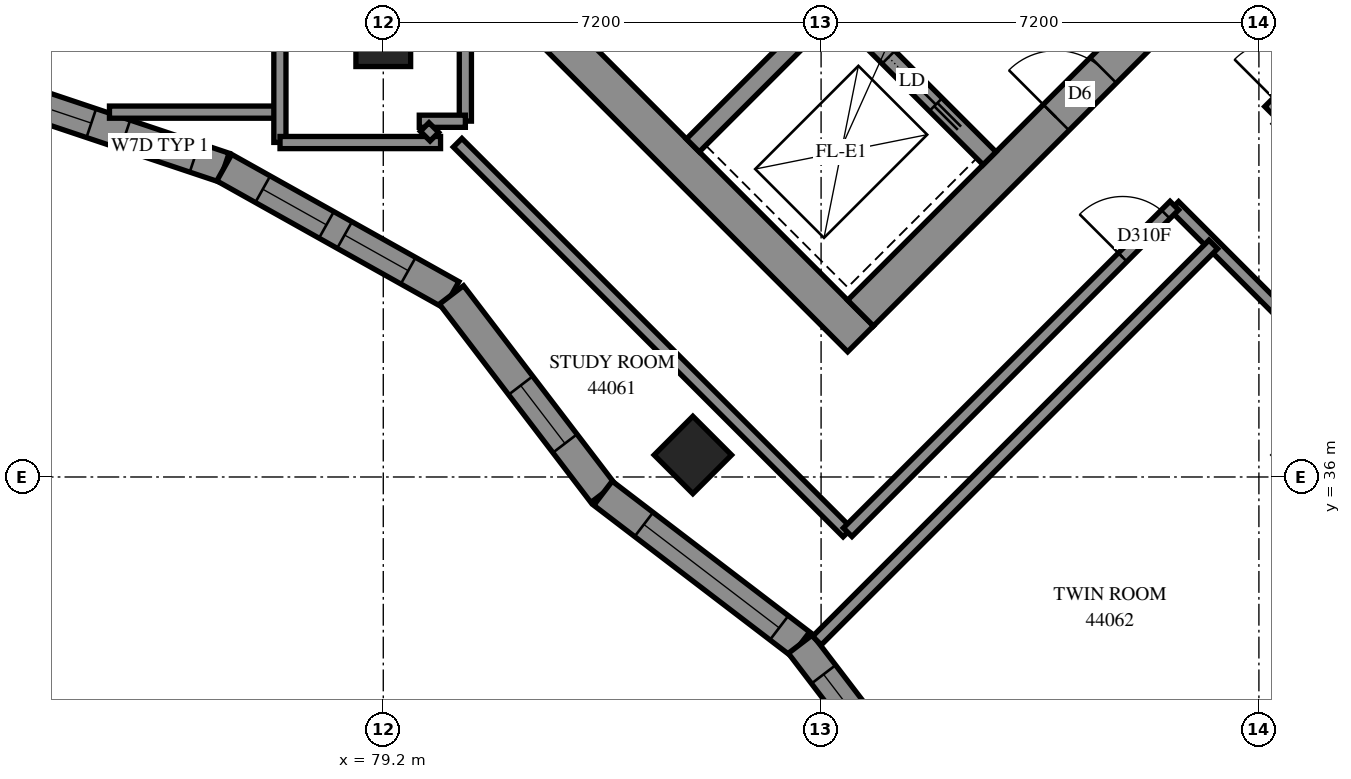
"""IFC4 building model, lengths in metres.
Left out: names, types, materials, properties, quantities, classifications, styles, units other than length and angle.
Written with IfcOpenShell. Run it as: python <this file> out.ifc"""

import sys

from ifc_helpers import new_model, si_unit, direction, frame, frame_2d, origin, origin_2d, place, context, subcontext, project, spatial, polyline, rectangle, outline, extrude, element, fill, save


model = new_model("IFC4")
c1 = context("Model", 3, precision=1e-05, world=origin(), true_north=direction((0.0, 1.0)))
c2 = subcontext(c1, "Body", "Model", "MODEL_VIEW")
j1 = project(units=[si_unit("LENGTHUNIT", "METRE"), si_unit("PLANEANGLEUNIT", "RADIAN")], contexts=[c1])
p1 = place(None, origin())
s1 = spatial("IfcSite", under=j1, at=p1, CompositionType="ELEMENT")
p2 = place(p1, origin())
s2 = spatial("IfcBuilding", under=s1, at=p2, CompositionType="ELEMENT")
p3 = place(p2, frame((0.0, 0.0, 162.6)))
s3 = spatial("IfcBuildingStorey", under=s2, at=p3, CompositionType="ELEMENT", Elevation=162.6)
for number, where, z_axis, x_axis in (
    (1, (79.2, 43.2, 0.0), (0.0, 0.0, 1.0), (1.0, 0.0, 0.0)),
    (2, (84.291, 36.362, 0.0), (0.0, 0.0, 1.0), (0.707, -0.707, 0.0)),
):
    element("IfcColumn", number, at=place(p3, frame(where, z_axis=z_axis, x_axis=x_axis)), inside=s3, PredefinedType="COLUMN", context=c2, shape_type="SweptSolid", body=[
        extrude(rectangle(XDim=0.9, YDim=0.9, at=origin_2d()), origin(), (0.0, 0.0, 1.0), 3.1),
    ])
p4 = place(p3, frame((76.018, 49.302, -0.3), z_axis=(0.0, 0.0, 1.0), x_axis=(0.7071067812, -0.7071067812, 0.0)))
e3 = element("IfcWall", 3, at=p4, inside=s3, PredefinedType="SHEAR", context=c2, shape_type="SweptSolid", body=[
    extrude(rectangle(XDim=15.6, YDim=0.6, at=frame_2d((7.8, 0.0))), origin(), (0.0, 0.0, 1.0), 2.7),
])
p5 = place(p3, frame((87.049, 38.695, -0.3), z_axis=(0.0, 0.0, 1.0), x_axis=(0.7071067812, 0.7071067812, 0.0)))
e4 = element("IfcWall", 4, at=p5, inside=s3, PredefinedType="SHEAR", context=c2, shape_type="SweptSolid", body=[
    extrude(rectangle(XDim=14.4, YDim=0.6, at=frame_2d((7.2, 0.0))), origin(), (0.0, 0.0, 1.0), 2.7),
])
p6 = place(p5, frame((4.55, 0.0, 0.3)))
e5 = element("IfcOpeningElement", 5, at=p6, cuts=e4, PredefinedType="OPENING", context=c2, shape_type="SweptSolid", body=[
    extrude(rectangle(XDim=1.1, YDim=2.1, at=frame_2d((0.55, 1.05))), frame((0.0, 0.31, 0.0), z_axis=(0.0, -1.0, 0.0), x_axis=(1.0, 0.0, 0.0)), (0.0, 0.0, 1.0), 0.62),
])
p7 = place(p5, frame((11.35, 0.0, 0.3)))
e6 = element("IfcOpeningElement", 6, at=p7, cuts=e4, PredefinedType="OPENING", context=c2, shape_type="SweptSolid", body=[
    extrude(rectangle(XDim=1.1, YDim=2.1, at=frame_2d((0.55, 1.05))), frame((0.0, 0.31, 0.0), z_axis=(0.0, -1.0, 0.0), x_axis=(1.0, 0.0, 0.0)), (0.0, 0.0, 1.0), 0.62),
])
p8 = place(p3, frame((84.291, 41.453, 0.0), z_axis=(0.0, 0.0, 1.0), x_axis=(0.7071067812, 0.7071067812, 0.0)))
e7 = element("IfcWall", 7, at=p8, inside=s3, PredefinedType="SOLIDWALL", context=c2, shape_type="SweptSolid", body=[
    extrude(rectangle(XDim=3.3, YDim=0.3, at=frame_2d((1.65, 0.0))), origin(), (0.0, 0.0, 1.0), 3.1),
])
p9 = place(p3, frame((78.988, 51.423, 0.0), z_axis=(0.0, 0.0, 1.0), x_axis=(0.7071067812, -0.7071067812, 0.0)))
e8 = element("IfcWall", 8, at=p9, inside=s3, PredefinedType="SOLIDWALL", context=c2, shape_type="SweptSolid", body=[
    extrude(rectangle(XDim=14.4, YDim=0.3, at=frame_2d((7.2, 0.0))), origin(), (0.0, 0.0, 1.0), 3.1),
])
p10 = place(p9, frame((1.35, 0.0, 0.0)))
e9 = element("IfcOpeningElement", 9, at=p10, cuts=e8, PredefinedType="OPENING", context=c2, shape_type="SweptSolid", body=[
    extrude(rectangle(XDim=0.9, YDim=2.1, at=frame_2d((0.45, 1.05))), frame((0.0, 0.16, 0.0), z_axis=(0.0, -1.0, 0.0), x_axis=(1.0, 0.0, 0.0)), (0.0, 0.0, 1.0), 0.32),
])
p11 = place(p9, frame((4.95, 0.0, 0.0)))
e10 = element("IfcOpeningElement", 10, at=p11, cuts=e8, PredefinedType="OPENING", context=c2, shape_type="SweptSolid", body=[
    extrude(rectangle(XDim=0.9, YDim=2.1, at=frame_2d((0.45, 1.05))), frame((0.0, 0.16, 0.0), z_axis=(0.0, -1.0, 0.0), x_axis=(1.0, 0.0, 0.0)), (0.0, 0.0, 1.0), 0.32),
])
p12 = place(p9, frame((8.55, 0.0, 0.0)))
e11 = element("IfcOpeningElement", 11, at=p12, cuts=e8, PredefinedType="OPENING", context=c2, shape_type="SweptSolid", body=[
    extrude(rectangle(XDim=0.9, YDim=2.1, at=frame_2d((0.45, 1.05))), frame((0.0, 0.16, 0.0), z_axis=(0.0, -1.0, 0.0), x_axis=(1.0, 0.0, 0.0)), (0.0, 0.0, 1.0), 0.32),
])
p13 = place(p9, frame((12.05, 0.0, 0.0)))
e12 = element("IfcOpeningElement", 12, at=p13, cuts=e8, PredefinedType="OPENING", context=c2, shape_type="SweptSolid", body=[
    extrude(rectangle(XDim=1.1, YDim=2.1, at=frame_2d((0.55, 1.05))), frame((0.0, 0.16, 0.0), z_axis=(0.0, -1.0, 0.0), x_axis=(1.0, 0.0, 0.0)), (0.0, 0.0, 1.0), 0.32),
])
p14 = place(p3, frame((73.094, 42.257, 0.0), z_axis=(0.0, 0.0, 1.0), x_axis=(0.9482477624, -0.3175313861, 0.0)))
e13 = element("IfcWall", 13, at=p14, inside=s3, PredefinedType="SOLIDWALL", context=c2, shape_type="SweptSolid", body=[
    extrude(outline(polyline([(0.061, -0.25), (3.658, -0.25), (3.705, 0.25), (-0.061, 0.25), (0.061, -0.25)])), origin(), (0.0, 0.0, 1.0), 3.1),
])
p15 = place(p14, frame((0.376, 0.0, 0.45)))
e14 = element("IfcOpeningElement", 14, at=p15, cuts=e13, PredefinedType="OPENING", context=c2, shape_type="SweptSolid", body=[
    extrude(rectangle(XDim=1.0, YDim=2.5, at=frame_2d((0.5, 1.25))), frame((0.0, 0.26, 0.0), z_axis=(0.0, -1.0, 0.0), x_axis=(1.0, 0.0, 0.0)), (0.0, 0.0, 1.0), 0.52),
])
p16 = place(p14, frame((1.967, 0.0, 0.5)))
e15 = element("IfcOpeningElement", 15, at=p16, cuts=e13, PredefinedType="OPENING", context=c2, shape_type="SweptSolid", body=[
    extrude(rectangle(XDim=1.2, YDim=2.45, at=frame_2d((0.6, 1.225))), frame((0.0, 0.26, 0.0), z_axis=(0.0, -1.0, 0.0), x_axis=(1.0, 0.0, 0.0)), (0.0, 0.0, 1.0), 0.52),
])
p17 = place(p3, frame((76.585, 41.088, 0.0), z_axis=(0.0, 0.0, 1.0), x_axis=(0.8724681922, -0.4886709053, 0.0)))
e16 = element("IfcWall", 16, at=p17, inside=s3, PredefinedType="SOLIDWALL", context=c2, shape_type="SweptSolid", body=[
    extrude(outline(polyline([(0.024, -0.25), (4.231, -0.25), (4.335, 0.25), (-0.024, 0.25), (0.024, -0.25)])), origin(), (0.0, 0.0, 1.0), 3.1),
])
p18 = place(p17, frame((0.727, 0.0, 0.45)))
e17 = element("IfcOpeningElement", 17, at=p18, cuts=e16, PredefinedType="OPENING", context=c2, shape_type="SweptSolid", body=[
    extrude(rectangle(XDim=1.2, YDim=2.5, at=frame_2d((0.6, 1.25))), frame((0.0, 0.26, 0.0), z_axis=(0.0, -1.0, 0.0), x_axis=(1.0, 0.0, 0.0)), (0.0, 0.0, 1.0), 0.52),
])
p19 = place(p17, frame((2.268, 0.0, 0.45)))
e18 = element("IfcOpeningElement", 18, at=p19, cuts=e16, PredefinedType="OPENING", context=c2, shape_type="SweptSolid", body=[
    extrude(rectangle(XDim=1.2, YDim=2.5, at=frame_2d((0.6, 1.25))), frame((0.0, 0.26, 0.0), z_axis=(0.0, -1.0, 0.0), x_axis=(1.0, 0.0, 0.0)), (0.0, 0.0, 1.0), 0.52),
])
p20 = place(p3, frame((80.322, 38.995, 0.0), z_axis=(0.0, 0.0, 1.0), x_axis=(0.6070711239, -0.7946475008, 0.0)))
e19 = element("IfcWall", 19, at=p20, inside=s3, PredefinedType="SOLIDWALL", context=c2, shape_type="SweptSolid", body=[
    extrude(outline(polyline([(0.052, -0.25), (4.138, -0.25), (4.071, 0.25), (-0.052, 0.25), (0.052, -0.25)])), origin(), (0.0, 0.0, 1.0), 3.1),
])
p21 = place(p20, frame((1.875, 0.0, 0.45)))
e20 = element("IfcOpeningElement", 20, at=p21, cuts=e19, PredefinedType="OPENING", context=c2, shape_type="SweptSolid", body=[
    extrude(rectangle(XDim=1.2, YDim=2.5, at=frame_2d((0.6, 1.25))), frame((0.0, 0.26, 0.0), z_axis=(0.0, -1.0, 0.0), x_axis=(1.0, 0.0, 0.0)), (0.0, 0.0, 1.0), 0.52),
])
p22 = place(p3, frame((82.813, 35.733, 0.0), z_axis=(0.0, 0.0, 1.0), x_axis=(0.7946501833, -0.6070676125, 0.0)))
e21 = element("IfcWall", 21, at=p22, inside=s3, PredefinedType="SOLIDWALL", context=c2, shape_type="SweptSolid", body=[
    extrude(outline(polyline([(-0.034, -0.25), (4.053, -0.25), (4.12, 0.25), (0.034, 0.25), (-0.034, -0.25)])), origin(), (0.0, 0.0, 1.0), 3.1),
])
p23 = place(p22, frame((0.846, 0.0, 0.45)))
e22 = element("IfcOpeningElement", 22, at=p23, cuts=e21, PredefinedType="OPENING", context=c2, shape_type="SweptSolid", body=[
    extrude(rectangle(XDim=2.8, YDim=2.5, at=frame_2d((1.4, 1.25))), frame((0.0, 0.26, 0.0), z_axis=(0.0, -1.0, 0.0), x_axis=(1.0, 0.0, 0.0)), (0.0, 0.0, 1.0), 0.52),
])
p24 = place(p3, frame((86.06, 33.252, 0.0), z_axis=(0.0, 0.0, 1.0), x_axis=(0.6070676125, -0.7946501833, 0.0)))
e23 = element("IfcWall", 23, at=p24, inside=s3, PredefinedType="SOLIDWALL", context=c2, shape_type="SweptSolid", body=[
    extrude(outline(polyline([(0.034, -0.25), (4.12, -0.25), (4.053, 0.25), (-0.034, 0.25), (0.034, -0.25)])), origin(), (0.0, 0.0, 1.0), 3.1),
])
p25 = place(p24, frame((0.626, 0.0, 0.45)))
e24 = element("IfcOpeningElement", 24, at=p25, cuts=e23, PredefinedType="OPENING", context=c2, shape_type="SweptSolid", body=[
    extrude(rectangle(XDim=2.8, YDim=2.5, at=frame_2d((1.4, 1.25))), frame((0.0, 0.26, 0.0), z_axis=(0.0, -1.0, 0.0), x_axis=(1.0, 0.0, 0.0)), (0.0, 0.0, 1.0), 0.52),
])
p26 = place(p3, frame((92.209, 40.459, 0.0), z_axis=(0.0, 0.0, 1.0), x_axis=(0.7071067812, -0.7071067812, 0.0)))
e25 = element("IfcWall", 25, at=p26, inside=s3, PredefinedType="PARTITIONING", context=c2, shape_type="SweptSolid", body=[
    extrude(rectangle(XDim=11.698, YDim=0.2, at=frame_2d((5.849, 0.0))), origin(), (0.0, 0.0, 1.0), 3.1),
])
p27 = place(p26, frame((2.908, 0.0, 0.0)))
e26 = element("IfcOpeningElement", 26, at=p27, cuts=e25, PredefinedType="OPENING", context=c2, shape_type="SweptSolid", body=[
    extrude(rectangle(XDim=0.9, YDim=2.1, at=frame_2d((0.45, 1.05))), frame((0.0, 0.11, 0.0), z_axis=(0.0, -1.0, 0.0), x_axis=(1.0, 0.0, 0.0)), (0.0, 0.0, 1.0), 0.22),
])
p28 = place(p26, frame((10.181, 0.0, 0.0)))
e27 = element("IfcOpeningElement", 27, at=p28, cuts=e25, PredefinedType="OPENING", context=c2, shape_type="SweptSolid", body=[
    extrude(rectangle(XDim=0.9, YDim=2.1, at=frame_2d((0.45, 1.05))), frame((0.0, 0.11, 0.0), z_axis=(0.0, -1.0, 0.0), x_axis=(1.0, 0.0, 0.0)), (0.0, 0.0, 1.0), 0.22),
])
p29 = place(p3, frame((93.767, 42.021, 0.0), z_axis=(0.0, 0.0, 1.0), x_axis=(0.7071067812, 0.7071067812, 0.0)))
e28 = element("IfcWall", 28, at=p29, inside=s3, PredefinedType="PARTITIONING", context=c2, shape_type="SweptSolid", body=[
    extrude(rectangle(XDim=9.998, YDim=0.2, at=frame_2d((4.999, 0.0))), origin(), (0.0, 0.0, 1.0), 3.1),
])
p30 = place(p29, frame((0.196, 0.0, 0.0)))
e29 = element("IfcOpeningElement", 29, at=p30, cuts=e28, PredefinedType="OPENING", context=c2, shape_type="SweptSolid", body=[
    extrude(rectangle(XDim=1.0, YDim=2.1, at=frame_2d((0.5, 1.05))), frame((0.0, 0.11, 0.0), z_axis=(0.0, -1.0, 0.0), x_axis=(1.0, 0.0, 0.0)), (0.0, 0.0, 1.0), 0.22),
])
p31 = place(p3, frame((86.332, 33.309, 0.0), z_axis=(0.0, 0.0, 1.0), x_axis=(0.7072098544, 0.7070036929, 0.0)))
e30 = element("IfcWall", 30, at=p31, inside=s3, PredefinedType="PARTITIONING", context=c2, shape_type="SweptSolid", body=[
    extrude(rectangle(XDim=9.216, YDim=0.2, at=frame_2d((4.608, 0.0))), origin(), (0.0, 0.0, 1.0), 3.1),
])
p32 = place(p3, frame((80.423, 41.497, 0.0), z_axis=(0.0, 0.0, 1.0), x_axis=(0.7071067812, -0.7071067812, 0.0)))
e31 = element("IfcWall", 31, at=p32, inside=s3, PredefinedType="PARTITIONING", context=c2, shape_type="SweptSolid", body=[
    extrude(rectangle(XDim=9.065, YDim=0.2, at=frame_2d((4.532, 0.0))), origin(), (0.0, 0.0, 1.0), 3.1),
])
p33 = place(p3, frame((86.837, 35.091, 0.0), z_axis=(0.0, 0.0, 1.0), x_axis=(0.7071067812, 0.7071067812, 0.0)))
e32 = element("IfcWall", 32, at=p33, inside=s3, PredefinedType="PARTITIONING", context=c2, shape_type="SweptSolid", body=[
    extrude(rectangle(XDim=7.597, YDim=0.2, at=frame_2d((3.799, 0.0))), origin(), (0.0, 0.0, 1.0), 3.1),
])
p34 = place(p33, frame((6.395, 0.0, 0.0)))
e33 = element("IfcOpeningElement", 33, at=p34, cuts=e32, PredefinedType="OPENING", context=c2, shape_type="SweptSolid", body=[
    extrude(rectangle(XDim=1.0, YDim=2.1, at=frame_2d((0.5, 1.05))), frame((0.0, 0.11, 0.0), z_axis=(0.0, -1.0, 0.0), x_axis=(1.0, 0.0, 0.0)), (0.0, 0.0, 1.0), 0.22),
])
p35 = place(p3, frame((91.364, 28.163, 0.0), z_axis=(0.0, 0.0, 1.0), x_axis=(0.7071067812, 0.7071067812, 0.0)))
e34 = element("IfcWall", 34, at=p35, inside=s3, PredefinedType="PARTITIONING", context=c2, shape_type="SweptSolid", body=[
    extrude(rectangle(XDim=6.896, YDim=0.2, at=frame_2d((3.448, 0.0))), origin(), (0.0, 0.0, 1.0), 3.1),
])
p36 = place(p3, frame((74.697, 42.0, 0.0), z_axis=(0.0, 0.0, 1.0), x_axis=(1.0, 0.0, 0.0)))
e35 = element("IfcWall", 35, at=p36, inside=s3, PredefinedType="PARTITIONING", context=c2, shape_type="SweptSolid", body=[
    extrude(rectangle(XDim=2.803, YDim=0.2, at=frame_2d((1.401, 0.0))), origin(), (0.0, 0.0, 1.0), 3.1),
])
for number, where, z_axis, x_axis in (
    (36, (77.5, 41.502, 0.0), (0.0, 0.0, 1.0), (0.0, 1.0, 0.0)),
    (37, (77.502, 41.5, 0.0), (0.0, 0.0, 1.0), (1.0, 0.0, 0.0)),
):
    element("IfcWall", number, at=place(p3, frame(where, z_axis=z_axis, x_axis=x_axis)), inside=s3, PredefinedType="PARTITIONING", context=c2, shape_type="SweptSolid", body=[
        extrude(rectangle(XDim=2.64, YDim=0.2, at=frame_2d((1.32, 0.0))), origin(), (0.0, 0.0, 1.0), 3.1),
    ])
p37 = place(p3, frame((80.55, 41.852, 0.0), z_axis=(0.0, 0.0, 1.0), x_axis=(0.0, 1.0, 0.0)))
e38 = element("IfcWall", 38, at=p37, inside=s3, PredefinedType="PARTITIONING", context=c2, shape_type="SweptSolid", body=[
    extrude(rectangle(XDim=2.38, YDim=0.2, at=frame_2d((1.19, 0.0))), origin(), (0.0, 0.0, 1.0), 3.1),
])
p38 = place(p3, frame((79.792, 41.85, 0.0), z_axis=(0.0, 0.0, 1.0), x_axis=(1.0, 0.0, 0.0)))
e39 = element("IfcWall", 39, at=p38, inside=s3, PredefinedType="PARTITIONING", context=c2, shape_type="SweptSolid", body=[
    extrude(rectangle(XDim=0.758, YDim=0.2, at=frame_2d((0.379, 0.0))), origin(), (0.0, 0.0, 1.0), 3.1),
])
p39 = place(p3, frame((79.881, 41.755, 0.0), z_axis=(0.0, 0.0, 1.0), x_axis=(0.7071067812, -0.7071067812, 0.0)))
e40 = element("IfcWall", 40, at=p39, inside=s3, PredefinedType="PARTITIONING", context=c2, shape_type="SweptSolid", body=[
    extrude(rectangle(XDim=0.225, YDim=0.2, at=frame_2d((0.113, 0.0))), origin(), (0.0, 0.0, 1.0), 3.1),
])
p40 = place(p18, origin())
e41 = element("IfcWindow", 41, at=p40, inside=s3, PartitioningType="SINGLE_PANEL", PredefinedType="WINDOW", context=c2, shape_type="SweptSolid", body=[
    extrude(rectangle(XDim=1.2, YDim=2.5, at=frame_2d((0.6, 1.25))), frame((0.0, 0.18, 0.0), z_axis=(0.0, -1.0, 0.0), x_axis=(1.0, 0.0, 0.0)), (0.0, 0.0, 1.0), 0.06),
])
fill(e17, e41)
p41 = place(p19, origin())
e42 = element("IfcWindow", 42, at=p41, inside=s3, PartitioningType="SINGLE_PANEL", PredefinedType="WINDOW", context=c2, shape_type="SweptSolid", body=[
    extrude(rectangle(XDim=1.2, YDim=2.5, at=frame_2d((0.6, 1.25))), frame((0.0, 0.18, 0.0), z_axis=(0.0, -1.0, 0.0), x_axis=(1.0, 0.0, 0.0)), (0.0, 0.0, 1.0), 0.06),
])
fill(e18, e42)
p42 = place(p21, origin())
e43 = element("IfcWindow", 43, at=p42, inside=s3, PartitioningType="SINGLE_PANEL", PredefinedType="WINDOW", context=c2, shape_type="SweptSolid", body=[
    extrude(rectangle(XDim=1.2, YDim=2.5, at=frame_2d((0.6, 1.25))), frame((0.0, 0.18, 0.0), z_axis=(0.0, -1.0, 0.0), x_axis=(1.0, 0.0, 0.0)), (0.0, 0.0, 1.0), 0.06),
])
fill(e20, e43)
p43 = place(p23, origin())
e44 = element("IfcWindow", 44, at=p43, inside=s3, PartitioningType="SINGLE_PANEL", PredefinedType="WINDOW", context=c2, shape_type="SweptSolid", body=[
    extrude(rectangle(XDim=2.8, YDim=2.5, at=frame_2d((1.4, 1.25))), frame((0.0, 0.18, 0.0), z_axis=(0.0, -1.0, 0.0), x_axis=(1.0, 0.0, 0.0)), (0.0, 0.0, 1.0), 0.06),
])
fill(e22, e44)
p44 = place(p25, origin())
e45 = element("IfcWindow", 45, at=p44, inside=s3, PartitioningType="SINGLE_PANEL", PredefinedType="WINDOW", context=c2, shape_type="SweptSolid", body=[
    extrude(rectangle(XDim=2.8, YDim=2.5, at=frame_2d((1.4, 1.25))), frame((0.0, 0.18, 0.0), z_axis=(0.0, -1.0, 0.0), x_axis=(1.0, 0.0, 0.0)), (0.0, 0.0, 1.0), 0.06),
])
fill(e24, e45)
p45 = place(p6, origin())
e46 = element("IfcDoor", 46, at=p45, inside=s3, OperationType="DOUBLE_DOOR_SINGLE_SWING", PredefinedType="DOOR", context=c2, shape_type="SweptSolid", body=[
    extrude(rectangle(XDim=1.1, YDim=2.1, at=frame_2d((0.55, 1.05))), frame((0.0, 0.025, 0.0), z_axis=(0.0, -1.0, 0.0), x_axis=(1.0, 0.0, 0.0)), (0.0, 0.0, 1.0), 0.05),
])
fill(e5, e46)
p46 = place(p13, origin())
e47 = element("IfcDoor", 47, at=p46, inside=s3, OperationType="SLIDING_TO_RIGHT", PredefinedType="DOOR", context=c2, shape_type="SweptSolid", body=[
    extrude(rectangle(XDim=1.1, YDim=2.1, at=frame_2d((0.55, 1.05))), frame((0.0, 0.025, 0.0), z_axis=(0.0, -1.0, 0.0), x_axis=(1.0, 0.0, 0.0)), (0.0, 0.0, 1.0), 0.05),
])
fill(e12, e47)
p47 = place(p34, origin())
e48 = element("IfcDoor", 48, at=p47, inside=s3, OperationType="SINGLE_SWING_LEFT", PredefinedType="DOOR", context=c2, shape_type="SweptSolid", body=[
    extrude(rectangle(XDim=1.0, YDim=2.1, at=frame_2d((0.5, 1.05))), frame((0.0, 0.025, 0.0), z_axis=(0.0, -1.0, 0.0), x_axis=(1.0, 0.0, 0.0)), (0.0, 0.0, 1.0), 0.05),
])
fill(e33, e48)
p48 = place(p15, origin())
e49 = element("IfcWindow", 49, at=p48, inside=s3, PartitioningType="SINGLE_PANEL", PredefinedType="WINDOW", context=c2, shape_type="SweptSolid", body=[
    extrude(rectangle(XDim=1.0, YDim=2.5, at=frame_2d((0.5, 1.25))), frame((0.0, 0.18, 0.0), z_axis=(0.0, -1.0, 0.0), x_axis=(1.0, 0.0, 0.0)), (0.0, 0.0, 1.0), 0.06),
])
fill(e14, e49)
p49 = place(p16, origin())
e50 = element("IfcWindow", 50, at=p49, inside=s3, PartitioningType="SINGLE_PANEL", PredefinedType="WINDOW", context=c2, shape_type="SweptSolid", body=[
    extrude(rectangle(XDim=1.2, YDim=2.45, at=frame_2d((0.6, 1.225))), frame((0.0, 0.18, 0.0), z_axis=(0.0, -1.0, 0.0), x_axis=(1.0, 0.0, 0.0)), (0.0, 0.0, 1.0), 0.06),
])
fill(e15, e50)
save(model, sys.argv[1])
